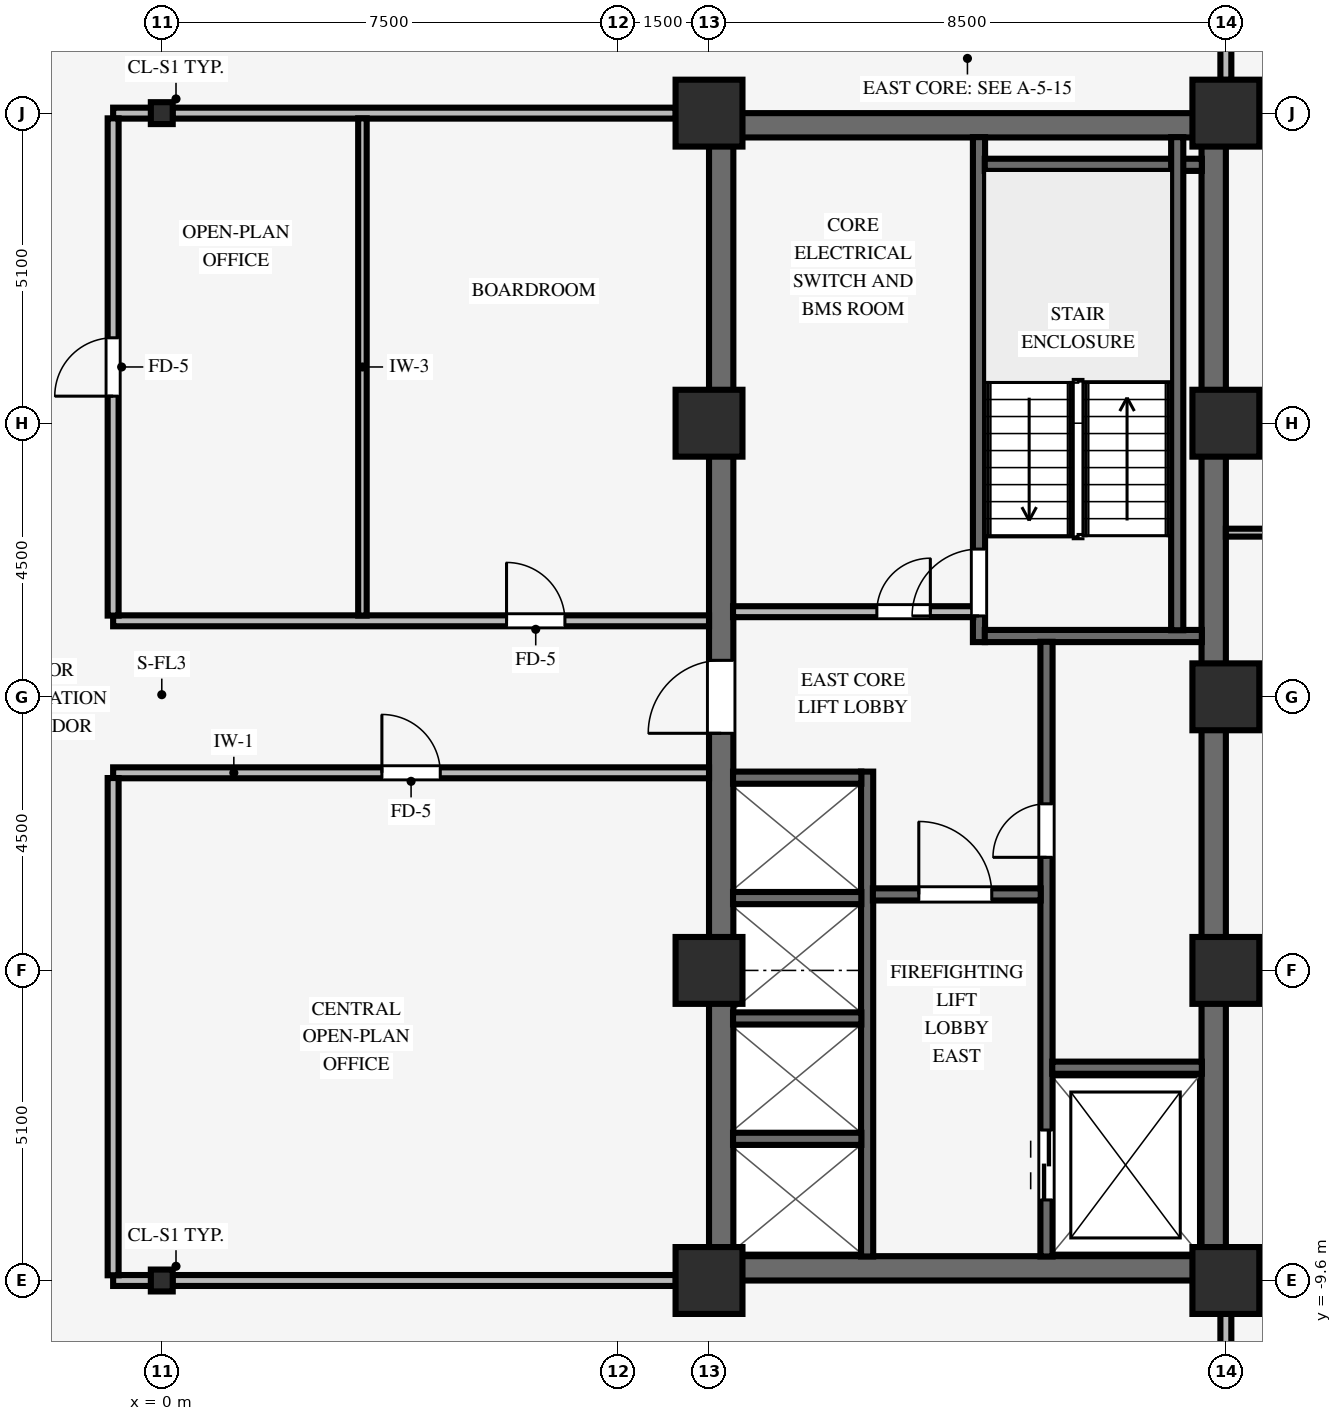
"""IFC4 building model, lengths in metres.
Left out: names, types, materials, properties, quantities, classifications, styles, units other than length and angle.
Written with IfcOpenShell. Run it as: python <this file> out.ifc"""

import sys

from ifc_helpers import new_model, si_unit, direction, frame, frame_2d, origin, origin_2d, place, context, subcontext, project, spatial, rectangle, i_section, extrude, source, transform, mapped, element, fill, save


model = new_model("IFC4")
c1 = context("Model", 3, precision=1e-05, world=origin(), true_north=direction((0.0, 1.0)))
c2 = subcontext(c1, "Body", "Model", "MODEL_VIEW")
j1 = project(units=[si_unit("LENGTHUNIT", "METRE"), si_unit("PLANEANGLEUNIT", "RADIAN")], contexts=[c1])
p1 = place(None, origin())
s1 = spatial("IfcSite", under=j1, at=p1, CompositionType="ELEMENT")
p2 = place(p1, origin())
s2 = spatial("IfcBuilding", under=s1, at=p2, CompositionType="ELEMENT")
p3 = place(p2, frame((0.0, 0.0, 116.55)))
s3 = spatial("IfcBuildingStorey", under=s2, at=p3, CompositionType="ELEMENT", Elevation=116.55)
for number, where, z_axis, x_axis in (
    (1, (9.0, -9.4, 0.0), (0.0, 0.0, 1.0), (1.0, 0.0, 0.0)),
    (2, (9.0, 9.4, 0.0), (0.0, 0.0, 1.0), (1.0, 0.0, 0.0)),
):
    element("IfcWall", number, at=place(p3, frame(where, z_axis=z_axis, x_axis=x_axis)), inside=s3, PredefinedType="SHEAR", context=c2, shape_type="SweptSolid", body=[
        extrude(rectangle(XDim=8.5, YDim=0.4, at=frame_2d((4.25, 0.0))), origin(), (0.0, 0.0, 1.0), 3.37),
    ])
p4 = place(p3, frame((9.2, -9.205, 0.0), z_axis=(0.0, 0.0, 1.0), x_axis=(0.0, 1.0, 0.0)))
e3 = element("IfcWall", 3, at=p4, inside=s3, PredefinedType="SHEAR", context=c2, shape_type="SweptSolid", body=[
    extrude(rectangle(XDim=18.41, YDim=0.4, at=frame_2d((9.205, 0.0))), origin(), (0.0, 0.0, 1.0), 3.37),
])
p5 = place(p4, frame((8.605, 0.0, 0.0)))
e4 = element("IfcOpeningElement", 4, at=p5, cuts=e3, PredefinedType="OPENING", context=c2, shape_type="SweptSolid", body=[
    extrude(rectangle(XDim=1.2, YDim=2.15, at=frame_2d((0.6, 1.075))), frame((0.0, 0.21, 0.0), z_axis=(0.0, -1.0, 0.0), x_axis=(1.0, 0.0, 0.0)), (0.0, 0.0, 1.0), 0.42),
])
p6 = place(p3, frame((17.3, -9.205, 0.0), z_axis=(0.0, 0.0, 1.0), x_axis=(0.0, 1.0, 0.0)))
e5 = element("IfcWall", 5, at=p6, inside=s3, PredefinedType="SHEAR", context=c2, shape_type="SweptSolid", body=[
    extrude(rectangle(XDim=18.41, YDim=0.4, at=frame_2d((9.205, 0.0))), origin(), (0.0, 0.0, 1.0), 3.37),
])
for number, where, z_axis, x_axis in (
    (6, (9.0, -9.6, 0.0), (0.0, 0.0, 1.0), (1.0, 0.0, 0.0)),
    (7, (9.0, -4.5, 0.0), (0.0, 0.0, 1.0), (1.0, 0.0, 0.0)),
    (8, (9.0, 4.5, 0.0), (0.0, 0.0, 1.0), (1.0, 0.0, 0.0)),
    (9, (9.0, 9.6, 0.0), (0.0, 0.0, 1.0), (1.0, 0.0, 0.0)),
    (10, (17.5, -9.6, 0.0), (0.0, 0.0, 1.0), (1.0, 0.0, 0.0)),
    (11, (17.5, -4.5, 0.0), (0.0, 0.0, 1.0), (1.0, 0.0, 0.0)),
    (12, (17.5, 4.5, 0.0), (0.0, 0.0, 1.0), (1.0, 0.0, 0.0)),
    (13, (17.5, 9.6, 0.0), (0.0, 0.0, 1.0), (1.0, 0.0, 0.0)),
    (14, (17.5, 0.0, 0.0), (0.0, 0.0, 1.0), (1.0, 0.0, 0.0)),
):
    element("IfcColumn", number, at=place(p3, frame(where, z_axis=z_axis, x_axis=x_axis)), inside=s3, PredefinedType="COLUMN", context=c2, shape_type="SweptSolid", body=[
        extrude(rectangle(XDim=1.1, YDim=1.1, at=origin_2d()), origin(), (0.0, 0.0, 1.0), 3.37),
    ])
for number, where, z_axis, x_axis in (
    (15, (0.0, -9.6, 0.0), (0.0, 0.0, 1.0), (1.0, 0.0, 0.0)),
    (16, (0.0, 9.6, 0.0), (0.0, 0.0, 1.0), (1.0, 0.0, 0.0)),
):
    element("IfcColumn", number, at=place(p3, frame(where, z_axis=z_axis, x_axis=x_axis)), inside=s3, PredefinedType="COLUMN", context=c2, shape_type="SweptSolid", body=[
        extrude(i_section(OverallWidth=0.36, OverallDepth=0.36, WebThickness=0.021, FlangeThickness=0.021, FilletRadius=0.018, at=origin_2d()), origin(), (0.0, 0.0, 1.0), 3.37),
    ])
p7 = place(p3, frame((13.44, 0.9, 0.0), z_axis=(0.0, 0.0, 1.0), x_axis=(0.0, 1.0, 0.0)))
e17 = element("IfcWall", 17, at=p7, inside=s3, PredefinedType="SHEAR", context=c2, shape_type="SweptSolid", body=[
    extrude(rectangle(XDim=8.305, YDim=0.2, at=frame_2d((4.153, 0.0))), origin(), (0.0, 0.0, 1.0), 3.37),
])
p8 = place(p7, frame((0.43, 0.0, 0.0)))
e18 = element("IfcOpeningElement", 18, at=p8, cuts=e17, PredefinedType="OPENING", context=c2, shape_type="SweptSolid", body=[
    extrude(rectangle(XDim=1.1, YDim=2.15, at=frame_2d((0.55, 1.075))), frame((0.0, 0.11, 0.0), z_axis=(0.0, -1.0, 0.0), x_axis=(1.0, 0.0, 0.0)), (0.0, 0.0, 1.0), 0.22),
])
for number, where, z_axis, x_axis in (
    (19, (13.535, 1.0, 0.0), (0.0, 0.0, 1.0), (1.0, 0.0, 0.0)),
    (20, (13.535, 8.75, 0.0), (0.0, 0.0, 1.0), (1.0, 0.0, 0.0)),
):
    element("IfcWall", number, at=place(p3, frame(where, z_axis=z_axis, x_axis=x_axis)), inside=s3, PredefinedType="SHEAR", context=c2, shape_type="SweptSolid", body=[
        extrude(rectangle(XDim=3.57, YDim=0.2, at=frame_2d((1.785, 0.0))), origin(), (0.0, 0.0, 1.0), 3.37),
    ])
p9 = place(p3, frame((16.7, 1.095, 0.0), z_axis=(0.0, 0.0, 1.0), x_axis=(0.0, 1.0, 0.0)))
e21 = element("IfcWall", 21, at=p9, inside=s3, PredefinedType="SHEAR", context=c2, shape_type="SweptSolid", body=[
    extrude(rectangle(XDim=8.11, YDim=0.2, at=frame_2d((4.055, 0.0))), origin(), (0.0, 0.0, 1.0), 3.37),
])
p10 = place(p3, frame((14.55, -9.205, 0.0), z_axis=(0.0, 0.0, 1.0), x_axis=(0.0, 1.0, 0.0)))
e22 = element("IfcWall", 22, at=p10, inside=s3, PredefinedType="SHEAR", context=c2, shape_type="SweptSolid", body=[
    extrude(rectangle(XDim=10.11, YDim=0.2, at=frame_2d((5.055, 0.0))), origin(), (0.0, 0.0, 1.0), 3.37),
])
p11 = place(p10, frame((6.565, 0.0, 0.0)))
e23 = element("IfcOpeningElement", 23, at=p11, cuts=e22, PredefinedType="OPENING", context=c2, shape_type="SweptSolid", body=[
    extrude(rectangle(XDim=0.88, YDim=2.1, at=frame_2d((0.44, 1.05))), frame((0.0, 0.11, 0.0), z_axis=(0.0, -1.0, 0.0), x_axis=(1.0, 0.0, 0.0)), (0.0, 0.0, 1.0), 0.22),
])
p12 = place(p10, frame((0.93, 0.0, 0.0)))
e24 = element("IfcOpeningElement", 24, at=p12, cuts=e22, PredefinedType="OPENING", context=c2, shape_type="SweptSolid", body=[
    extrude(rectangle(XDim=1.15, YDim=2.15, at=frame_2d((0.575, 1.075))), frame((0.0, 0.11, 0.0), z_axis=(0.0, -1.0, 0.0), x_axis=(1.0, 0.0, 0.0)), (0.0, 0.0, 1.0), 0.22),
])
p13 = place(p3, frame((14.645, -6.1, 0.0), z_axis=(0.0, 0.0, 1.0), x_axis=(1.0, 0.0, 0.0)))
e25 = element("IfcWall", 25, at=p13, inside=s3, PredefinedType="SHEAR", context=c2, shape_type="SweptSolid", body=[
    extrude(rectangle(XDim=2.46, YDim=0.2, at=frame_2d((1.23, 0.0))), origin(), (0.0, 0.0, 1.0), 3.37),
])
p14 = place(p3, frame((11.6, -9.205, 0.0), z_axis=(0.0, 0.0, 1.0), x_axis=(0.0, 1.0, 0.0)))
e26 = element("IfcWall", 26, at=p14, inside=s3, PredefinedType="SHEAR", context=c2, shape_type="SweptSolid", body=[
    extrude(rectangle(XDim=7.975, YDim=0.2, at=frame_2d((3.988, 0.0))), origin(), (0.0, 0.0, 1.0), 3.37),
])
p15 = place(p3, frame((11.695, -3.25, 0.0), z_axis=(0.0, 0.0, 1.0), x_axis=(1.0, 0.0, 0.0)))
e27 = element("IfcWall", 27, at=p15, inside=s3, PredefinedType="SHEAR", context=c2, shape_type="SweptSolid", body=[
    extrude(rectangle(XDim=2.76, YDim=0.2, at=frame_2d((1.38, 0.0))), origin(), (0.0, 0.0, 1.0), 3.37),
])
p16 = place(p15, frame((0.755, 0.0, 0.0)))
e28 = element("IfcOpeningElement", 28, at=p16, cuts=e27, PredefinedType="OPENING", context=c2, shape_type="SweptSolid", body=[
    extrude(rectangle(XDim=1.2, YDim=2.15, at=frame_2d((0.6, 1.075))), frame((0.0, 0.11, 0.0), z_axis=(0.0, -1.0, 0.0), x_axis=(1.0, 0.0, 0.0)), (0.0, 0.0, 1.0), 0.22),
])
for number, where, z_axis, x_axis in (
    (29, (9.395, -7.27, 0.0), (0.0, 0.0, 1.0), (1.0, 0.0, 0.0)),
    (30, (9.395, -5.29, 0.0), (0.0, 0.0, 1.0), (1.0, 0.0, 0.0)),
    (31, (9.395, -3.31, 0.0), (0.0, 0.0, 1.0), (1.0, 0.0, 0.0)),
    (32, (9.395, -1.33, 0.0), (0.0, 0.0, 1.0), (1.0, 0.0, 0.0)),
):
    element("IfcWall", number, at=place(p3, frame(where, z_axis=z_axis, x_axis=x_axis)), inside=s3, PredefinedType="SHEAR", context=c2, shape_type="SweptSolid", body=[
        extrude(rectangle(XDim=2.11, YDim=0.2, at=frame_2d((1.055, 0.0))), origin(), (0.0, 0.0, 1.0), 3.37),
    ])
p17 = place(p3, frame((9.395, 1.4, 0.0), z_axis=(0.0, 0.0, 1.0), x_axis=(1.0, 0.0, 0.0)))
e33 = element("IfcWall", 33, at=p17, inside=s3, PredefinedType="PARTITIONING", context=c2, shape_type="SweptSolid", body=[
    extrude(rectangle(XDim=3.95, YDim=0.18, at=frame_2d((1.975, 0.0))), origin(), (0.0, 0.0, 1.0), 3.36),
])
p18 = place(p17, frame((2.365, 0.0, 0.0)))
e34 = element("IfcOpeningElement", 34, at=p18, cuts=e33, PredefinedType="OPENING", context=c2, shape_type="SweptSolid", body=[
    extrude(rectangle(XDim=0.88, YDim=2.1, at=frame_2d((0.44, 1.05))), frame((0.0, 0.1, 0.0), z_axis=(0.0, -1.0, 0.0), x_axis=(1.0, 0.0, 0.0)), (0.0, 0.0, 1.0), 0.2),
])
p19 = place(p3, frame((-0.8, -9.6, 0.0), z_axis=(0.0, 0.0, 1.0), x_axis=(1.0, 0.0, 0.0)))
e35 = element("IfcWall", 35, at=p19, inside=s3, PredefinedType="PARTITIONING", context=c2, shape_type="SweptSolid", body=[
    extrude(rectangle(XDim=0.624, YDim=0.18, at=frame_2d((0.312, 0.0))), origin(), (0.0, 0.0, 1.0), 2.405),
])
p20 = place(p3, frame((0.176, -9.6, 0.0), z_axis=(0.0, 0.0, 1.0), x_axis=(1.0, 0.0, 0.0)))
e36 = element("IfcWall", 36, at=p20, inside=s3, PredefinedType="PARTITIONING", context=c2, shape_type="SweptSolid", body=[
    extrude(rectangle(XDim=8.278, YDim=0.18, at=frame_2d((4.139, 0.0))), origin(), (0.0, 0.0, 1.0), 2.405),
])
p21 = place(p3, frame((-0.8, -1.25, 0.0), z_axis=(0.0, 0.0, 1.0), x_axis=(1.0, 0.0, 0.0)))
e37 = element("IfcWall", 37, at=p21, inside=s3, PredefinedType="PARTITIONING", context=c2, shape_type="SweptSolid", body=[
    extrude(rectangle(XDim=9.8, YDim=0.18, at=frame_2d((4.9, 0.0))), origin(), (0.0, 0.0, 1.0), 3.36),
])
p22 = place(p21, frame((4.42, 0.0, 0.0)))
e38 = element("IfcOpeningElement", 38, at=p22, cuts=e37, PredefinedType="OPENING", context=c2, shape_type="SweptSolid", body=[
    extrude(rectangle(XDim=0.96, YDim=2.1, at=frame_2d((0.48, 1.05))), frame((0.0, 0.1, 0.0), z_axis=(0.0, -1.0, 0.0), x_axis=(1.0, 0.0, 0.0)), (0.0, 0.0, 1.0), 0.2),
])
p23 = place(p3, frame((-0.8, 1.25, 0.0), z_axis=(0.0, 0.0, 1.0), x_axis=(1.0, 0.0, 0.0)))
e39 = element("IfcWall", 39, at=p23, inside=s3, PredefinedType="PARTITIONING", context=c2, shape_type="SweptSolid", body=[
    extrude(rectangle(XDim=9.8, YDim=0.18, at=frame_2d((4.9, 0.0))), origin(), (0.0, 0.0, 1.0), 3.36),
])
p24 = place(p23, frame((6.47, 0.0, 0.0)))
e40 = element("IfcOpeningElement", 40, at=p24, cuts=e39, PredefinedType="OPENING", context=c2, shape_type="SweptSolid", body=[
    extrude(rectangle(XDim=0.96, YDim=2.1, at=frame_2d((0.48, 1.05))), frame((0.0, 0.1, 0.0), z_axis=(0.0, -1.0, 0.0), x_axis=(1.0, 0.0, 0.0)), (0.0, 0.0, 1.0), 0.2),
])
p25 = place(p3, frame((17.5, 2.7, 0.0), z_axis=(0.0, 0.0, 1.0), x_axis=(1.0, 0.0, 0.0)))
e41 = element("IfcWall", 41, at=p25, inside=s3, PredefinedType="PARTITIONING", context=c2, shape_type="SweptSolid", body=[
    extrude(rectangle(XDim=8.725, YDim=0.13, at=frame_2d((4.363, 0.0))), origin(), (0.0, 0.0, 1.0), 3.36),
])
p26 = place(p3, frame((-0.8, 9.6, 0.0), z_axis=(0.0, 0.0, 1.0), x_axis=(1.0, 0.0, 0.0)))
e42 = element("IfcWall", 42, at=p26, inside=s3, PredefinedType="PARTITIONING", context=c2, shape_type="SweptSolid", body=[
    extrude(rectangle(XDim=0.624, YDim=0.18, at=frame_2d((0.312, 0.0))), origin(), (0.0, 0.0, 1.0), 2.405),
])
p27 = place(p3, frame((0.176, 9.6, 0.0), z_axis=(0.0, 0.0, 1.0), x_axis=(1.0, 0.0, 0.0)))
e43 = element("IfcWall", 43, at=p27, inside=s3, PredefinedType="PARTITIONING", context=c2, shape_type="SweptSolid", body=[
    extrude(rectangle(XDim=8.278, YDim=0.18, at=frame_2d((4.139, 0.0))), origin(), (0.0, 0.0, 1.0), 2.405),
])
p28 = place(p3, frame((-0.8, -9.514, 0.0), z_axis=(0.0, 0.0, 1.0), x_axis=(0.0, 1.0, 0.0)))
e44 = element("IfcWall", 44, at=p28, inside=s3, PredefinedType="PARTITIONING", context=c2, shape_type="SweptSolid", body=[
    extrude(rectangle(XDim=8.178, YDim=0.18, at=frame_2d((4.089, 0.0))), origin(), (0.0, 0.0, 1.0), 3.36),
])
p29 = place(p3, frame((-0.8, 1.336, 0.0), z_axis=(0.0, 0.0, 1.0), x_axis=(0.0, 1.0, 0.0)))
e45 = element("IfcWall", 45, at=p29, inside=s3, PredefinedType="PARTITIONING", context=c2, shape_type="SweptSolid", body=[
    extrude(rectangle(XDim=8.178, YDim=0.18, at=frame_2d((4.089, 0.0))), origin(), (0.0, 0.0, 1.0), 3.36),
])
p30 = place(p29, frame((3.609, 0.0, 0.0)))
e46 = element("IfcOpeningElement", 46, at=p30, cuts=e45, PredefinedType="OPENING", context=c2, shape_type="SweptSolid", body=[
    extrude(rectangle(XDim=0.96, YDim=2.1, at=frame_2d((0.48, 1.05))), frame((0.0, 0.1, 0.0), z_axis=(0.0, -1.0, 0.0), x_axis=(1.0, 0.0, 0.0)), (0.0, 0.0, 1.0), 0.2),
])
p31 = place(p3, frame((3.3, 1.336, 0.0), z_axis=(0.0, 0.0, 1.0), x_axis=(0.0, 1.0, 0.0)))
e47 = element("IfcWall", 47, at=p31, inside=s3, PredefinedType="PARTITIONING", context=c2, shape_type="SweptSolid", body=[
    extrude(rectangle(XDim=8.178, YDim=0.14, at=frame_2d((4.089, 0.0))), origin(), (0.0, 0.0, 1.0), 3.36),
])
for number, where, z_axis, x_axis in (
    (48, (17.5, -11.114, 0.0), (0.0, 0.0, 1.0), (0.0, 1.0, 0.0)),
    (49, (17.5, 10.146, 0.0), (0.0, 0.0, 1.0), (0.0, 1.0, 0.0)),
):
    element("IfcWall", number, at=place(p3, frame(where, z_axis=z_axis, x_axis=x_axis)), inside=s3, PredefinedType="PARTITIONING", context=c2, shape_type="SweptSolid", body=[
        extrude(rectangle(XDim=0.968, YDim=0.18, at=frame_2d((0.484, 0.0))), origin(), (0.0, 0.0, 1.0), 2.738),
    ])
m1 = source(origin(), c2, "Body", "SweptSolid", [
    extrude(rectangle(XDim=1.1, YDim=2.15, at=frame_2d((0.55, 1.075))), frame((0.0, 0.025, 0.0), z_axis=(0.0, -1.0, 0.0), x_axis=(1.0, 0.0, 0.0)), (0.0, 0.0, 1.0), 0.05),
])
p32 = place(p8, origin())
e50 = element("IfcDoor", 50, at=p32, inside=s3, OperationType="SINGLE_SWING_LEFT", PredefinedType="DOOR", context=c2, shape_type="MappedRepresentation", body=[
    mapped(m1, transform((0.0, 0.0, 0.0), scale=1.0)),
])
fill(e18, e50)
m2 = source(origin(), c2, "Body", "SweptSolid", [
    extrude(rectangle(XDim=0.88, YDim=2.1, at=frame_2d((0.44, 1.05))), frame((0.0, 0.025, 0.0), z_axis=(0.0, -1.0, 0.0), x_axis=(1.0, 0.0, 0.0)), (0.0, 0.0, 1.0), 0.05),
])
p33 = place(p11, origin())
e51 = element("IfcDoor", 51, at=p33, inside=s3, OperationType="SINGLE_SWING_LEFT", PredefinedType="DOOR", context=c2, shape_type="MappedRepresentation", body=[
    mapped(m2, transform((0.0, 0.0, 0.0), scale=1.0)),
])
fill(e23, e51)
m3 = source(origin(), c2, "Body", "SweptSolid", [
    extrude(rectangle(XDim=1.2, YDim=2.15, at=frame_2d((0.6, 1.075))), frame((0.0, 0.025, 0.0), z_axis=(0.0, -1.0, 0.0), x_axis=(1.0, 0.0, 0.0)), (0.0, 0.0, 1.0), 0.05),
])
p34 = place(p16, origin())
e52 = element("IfcDoor", 52, at=p34, inside=s3, OperationType="SINGLE_SWING_LEFT", PredefinedType="DOOR", context=c2, shape_type="MappedRepresentation", body=[
    mapped(m3, transform((0.0, 0.0, 0.0), scale=1.0)),
])
fill(e28, e52)
p35 = place(p5, origin())
e53 = element("IfcDoor", 53, at=p35, inside=s3, OperationType="SINGLE_SWING_LEFT", PredefinedType="DOOR", context=c2, shape_type="MappedRepresentation", body=[
    mapped(m3, transform((0.0, 0.0, 0.0), scale=1.0)),
])
fill(e4, e53)
p36 = place(p18, origin())
e54 = element("IfcDoor", 54, at=p36, inside=s3, OperationType="SINGLE_SWING_RIGHT", PredefinedType="DOOR", context=c2, shape_type="MappedRepresentation", body=[
    mapped(m2, transform((0.0, 0.0, 0.0), scale=1.0)),
])
fill(e34, e54)
m4 = source(origin(), c2, "Body", "SweptSolid", [
    extrude(rectangle(XDim=1.15, YDim=2.15, at=frame_2d((0.575, 1.075))), frame((0.0, 0.025, 0.0), z_axis=(0.0, -1.0, 0.0), x_axis=(1.0, 0.0, 0.0)), (0.0, 0.0, 1.0), 0.05),
])
p37 = place(p12, origin())
e55 = element("IfcDoor", 55, at=p37, inside=s3, OperationType="DOUBLE_DOOR_SLIDING", PredefinedType="DOOR", context=c2, shape_type="MappedRepresentation", body=[
    mapped(m4, transform((0.0, 0.0, 0.0), scale=1.0)),
])
fill(e24, e55)
m5 = source(origin(), c2, "Body", "SweptSolid", [
    extrude(rectangle(XDim=0.96, YDim=2.1, at=frame_2d((0.48, 1.05))), frame((0.0, 0.025, 0.0), z_axis=(0.0, -1.0, 0.0), x_axis=(1.0, 0.0, 0.0)), (0.0, 0.0, 1.0), 0.05),
])
p38 = place(p22, origin())
e56 = element("IfcDoor", 56, at=p38, inside=s3, OperationType="SINGLE_SWING_LEFT", PredefinedType="DOOR", context=c2, shape_type="MappedRepresentation", body=[
    mapped(m5, transform((0.0, 0.0, 0.0), scale=1.0)),
])
fill(e38, e56)
p39 = place(p30, origin())
e57 = element("IfcDoor", 57, at=p39, inside=s3, OperationType="SINGLE_SWING_LEFT", PredefinedType="DOOR", context=c2, shape_type="MappedRepresentation", body=[
    mapped(m5, transform((0.0, 0.0, 0.0), scale=1.0)),
])
fill(e46, e57)
p40 = place(p24, origin())
e58 = element("IfcDoor", 58, at=p40, inside=s3, OperationType="SINGLE_SWING_LEFT", PredefinedType="DOOR", context=c2, shape_type="MappedRepresentation", body=[
    mapped(m5, transform((0.0, 0.0, 0.0), scale=1.0)),
])
fill(e40, e58)
save(model, sys.argv[1])
